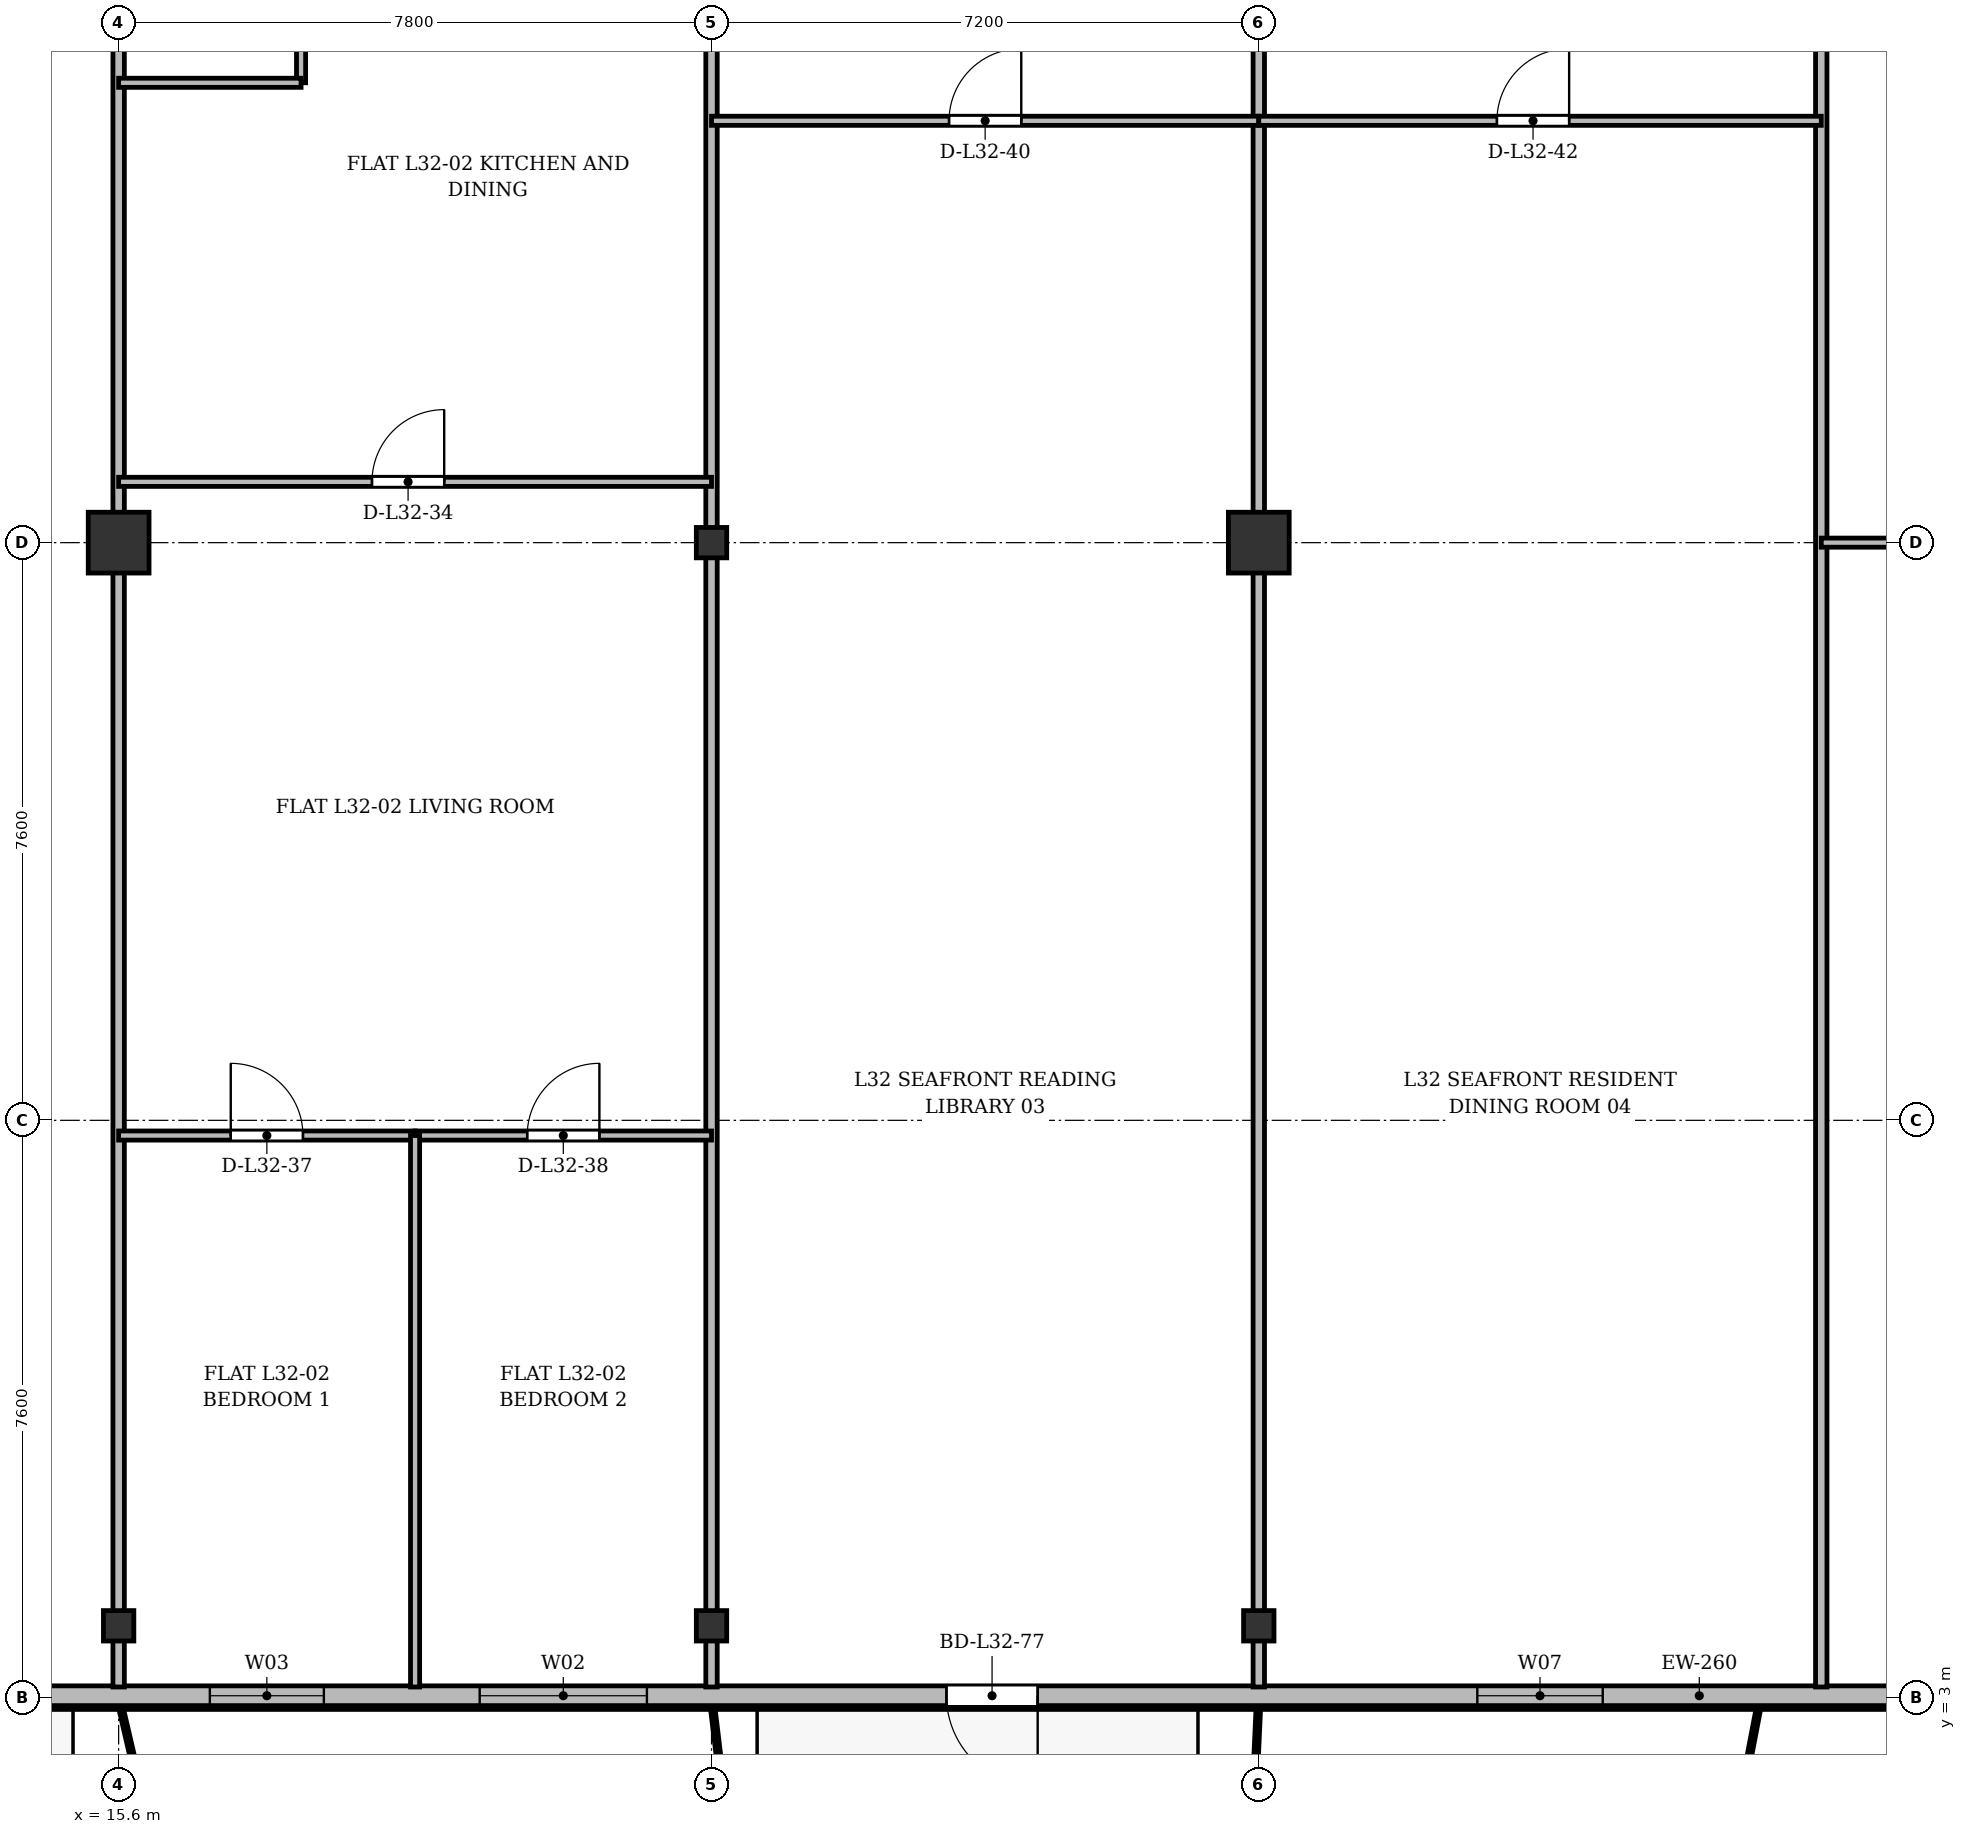
"""IFC4 building model, lengths in metres.
Left out: names, types, materials, properties, quantities, classifications, styles, units other than length and angle.
Written with IfcOpenShell. Run it as: python <this file> out.ifc"""

import sys

from ifc_helpers import new_model, si_unit, direction, frame, frame_2d, origin, origin_2d, place, context, subcontext, project, spatial, rectangle, i_section, extrude, source, transform, mapped, element, fill, save


model = new_model("IFC4")
c1 = context("Model", 3, precision=1e-05, world=origin(), true_north=direction((0.0, 1.0)))
c2 = subcontext(c1, "Body", "Model", "MODEL_VIEW")
j1 = project(units=[si_unit("LENGTHUNIT", "METRE"), si_unit("PLANEANGLEUNIT", "RADIAN")], contexts=[c1])
p1 = place(None, origin())
s1 = spatial("IfcSite", under=j1, at=p1, CompositionType="ELEMENT")
p2 = place(p1, origin())
s2 = spatial("IfcBuilding", under=s1, at=p2, CompositionType="ELEMENT")
p3 = place(p2, frame((0.0, 0.0, 124.9)))
s3 = spatial("IfcBuildingStorey", under=s2, at=p3, CompositionType="ELEMENT", Elevation=124.9)
m1 = source(origin(), c2, "Body", "SweptSolid", [
    extrude(i_section(OverallWidth=0.4, OverallDepth=0.4, WebThickness=0.022, FlangeThickness=0.035, at=origin_2d()), origin(), (0.0, 0.0, 1.0), 3.6),
])
p4 = place(p3, frame((15.6, 3.95, 0.0), z_axis=(0.0, 0.0, 1.0), x_axis=(1.0, 0.0, 0.0)))
e1 = element("IfcColumn", 1, at=p4, inside=s3, PredefinedType="COLUMN", context=c2, shape_type="MappedRepresentation", body=[
    mapped(m1, transform((0.0, 0.0, 0.0), x_axis=(1.0, 0.0, 0.0), y_axis=(0.0, 1.0, 0.0), z_axis=(0.0, 0.0, 1.0), scale=1.0)),
])
m2 = source(origin(), c2, "Body", "SweptSolid", [
    extrude(rectangle(XDim=0.8, YDim=0.8, at=origin_2d()), origin(), (0.0, 0.0, 1.0), 3.6),
])
p5 = place(p3, frame((15.6, 18.2, 0.0), z_axis=(0.0, 0.0, 1.0), x_axis=(1.0, 0.0, 0.0)))
e2 = element("IfcColumn", 2, at=p5, inside=s3, PredefinedType="COLUMN", context=c2, shape_type="MappedRepresentation", body=[
    mapped(m2, transform((0.0, 0.0, 0.0), x_axis=(1.0, 0.0, 0.0), y_axis=(0.0, 1.0, 0.0), z_axis=(0.0, 0.0, 1.0), scale=1.0)),
])
for number, where, z_axis, x_axis in (
    (3, (23.4, 3.95, 0.0), (0.0, 0.0, 1.0), (1.0, 0.0, 0.0)),
    (4, (23.4, 18.2, 0.0), (0.0, 0.0, 1.0), (1.0, 0.0, 0.0)),
    (5, (30.6, 3.95, 0.0), (0.0, 0.0, 1.0), (1.0, 0.0, 0.0)),
):
    element("IfcColumn", number, at=place(p3, frame(where, z_axis=z_axis, x_axis=x_axis)), inside=s3, PredefinedType="COLUMN", context=c2, shape_type="MappedRepresentation", body=[
        mapped(m1, transform((0.0, 0.0, 0.0), x_axis=(1.0, 0.0, 0.0), y_axis=(0.0, 1.0, 0.0), z_axis=(0.0, 0.0, 1.0), scale=1.0)),
    ])
p6 = place(p3, frame((30.6, 18.2, 0.0), z_axis=(0.0, 0.0, 1.0), x_axis=(1.0, 0.0, 0.0)))
e6 = element("IfcColumn", 6, at=p6, inside=s3, PredefinedType="COLUMN", context=c2, shape_type="MappedRepresentation", body=[
    mapped(m2, transform((0.0, 0.0, 0.0), x_axis=(1.0, 0.0, 0.0), y_axis=(0.0, 1.0, 0.0), z_axis=(0.0, 0.0, 1.0), scale=1.0)),
])
p7 = place(p3, frame((44.8, 3.03, 0.0), z_axis=(0.0, 0.0, 1.0), x_axis=(-1.0, 0.0, 0.0)))
e7 = element("IfcWall", 7, at=p7, inside=s3, PredefinedType="SOLIDWALL", context=c2, shape_type="SweptSolid", body=[
    extrude(rectangle(XDim=37.3, YDim=0.26, at=frame_2d((18.65, 0.0))), origin(), (0.0, 0.0, 1.0), 3.34),
])
p8 = place(p7, frame((2.9, 0.0, 0.9)))
e8 = element("IfcOpeningElement", 8, at=p8, cuts=e7, PredefinedType="OPENING", context=c2, shape_type="SweptSolid", body=[
    extrude(rectangle(XDim=2.0, YDim=1.95, at=frame_2d((1.0, 0.975))), frame((0.0, 0.14, 0.0), z_axis=(0.0, -1.0, 0.0), x_axis=(1.0, 0.0, 0.0)), (0.0, 0.0, 1.0), 0.28),
])
p9 = place(p7, frame((9.675, 0.0, 0.9)))
e9 = element("IfcOpeningElement", 9, at=p9, cuts=e7, PredefinedType="OPENING", context=c2, shape_type="SweptSolid", body=[
    extrude(rectangle(XDim=1.65, YDim=1.85, at=frame_2d((0.825, 0.925))), frame((0.0, 0.14, 0.0), z_axis=(0.0, -1.0, 0.0), x_axis=(1.0, 0.0, 0.0)), (0.0, 0.0, 1.0), 0.28),
])
p10 = place(p7, frame((17.109, 0.0, 0.0)))
e10 = element("IfcOpeningElement", 10, at=p10, cuts=e7, PredefinedType="OPENING", context=c2, shape_type="SweptSolid", body=[
    extrude(rectangle(XDim=1.2, YDim=2.2, at=frame_2d((0.6, 1.1))), frame((0.0, 0.14, 0.0), z_axis=(0.0, -1.0, 0.0), x_axis=(1.0, 0.0, 0.0)), (0.0, 0.0, 1.0), 0.28),
])
p11 = place(p7, frame((22.25, 0.0, 0.9)))
e11 = element("IfcOpeningElement", 11, at=p11, cuts=e7, PredefinedType="OPENING", context=c2, shape_type="SweptSolid", body=[
    extrude(rectangle(XDim=2.2, YDim=1.8, at=frame_2d((1.1, 0.9))), frame((0.0, 0.14, 0.0), z_axis=(0.0, -1.0, 0.0), x_axis=(1.0, 0.0, 0.0)), (0.0, 0.0, 1.0), 0.28),
])
p12 = place(p7, frame((26.5, 0.0, 0.9)))
e12 = element("IfcOpeningElement", 12, at=p12, cuts=e7, PredefinedType="OPENING", context=c2, shape_type="SweptSolid", body=[
    extrude(rectangle(XDim=1.5, YDim=1.75, at=frame_2d((0.75, 0.875))), frame((0.0, 0.14, 0.0), z_axis=(0.0, -1.0, 0.0), x_axis=(1.0, 0.0, 0.0)), (0.0, 0.0, 1.0), 0.28),
])
p13 = place(p7, frame((33.727, 0.0, 0.0)))
e13 = element("IfcOpeningElement", 13, at=p13, cuts=e7, PredefinedType="OPENING", context=c2, shape_type="SweptSolid", body=[
    extrude(rectangle(XDim=1.2, YDim=2.2, at=frame_2d((0.6, 1.1))), frame((0.0, 0.14, 0.0), z_axis=(0.0, -1.0, 0.0), x_axis=(1.0, 0.0, 0.0)), (0.0, 0.0, 1.0), 0.28),
])
for number, where, z_axis, x_axis in (
    (14, (15.6, 3.145, 0.0), (0.0, 0.0, 1.0), (0.0, 1.0, 0.0)),
    (15, (23.4, 3.145, 0.0), (0.0, 0.0, 1.0), (0.0, 1.0, 0.0)),
    (16, (30.6, 3.145, 0.0), (0.0, 0.0, 1.0), (0.0, 1.0, 0.0)),
):
    element("IfcWall", number, at=place(p3, frame(where, z_axis=z_axis, x_axis=x_axis)), inside=s3, PredefinedType="PARTITIONING", context=c2, shape_type="SweptSolid", body=[
        extrude(rectangle(XDim=24.455, YDim=0.15, at=frame_2d((12.228, 0.0))), origin(), (0.0, 0.0, 1.0), 2.84),
    ])
p14 = place(p3, frame((38.0, 3.145, 0.0), z_axis=(0.0, 0.0, 1.0), x_axis=(0.0, 1.0, 0.0)))
e17 = element("IfcWall", 17, at=p14, inside=s3, PredefinedType="PARTITIONING", context=c2, shape_type="SweptSolid", body=[
    extrude(rectangle(XDim=24.455, YDim=0.15, at=frame_2d((12.228, 0.0))), origin(), (0.0, 0.0, 1.0), 2.752),
])
p15 = place(p3, frame((15.6, 19.0, 0.0), z_axis=(0.0, 0.0, 1.0), x_axis=(1.0, 0.0, 0.0)))
e18 = element("IfcWall", 18, at=p15, inside=s3, PredefinedType="PARTITIONING", context=c2, shape_type="SweptSolid", body=[
    extrude(rectangle(XDim=7.8, YDim=0.12, at=frame_2d((3.9, 0.0))), origin(), (0.0, 0.0, 1.0), 2.84),
])
p16 = place(p15, frame((3.333, 0.0, 0.0)))
e19 = element("IfcOpeningElement", 19, at=p16, cuts=e18, PredefinedType="OPENING", context=c2, shape_type="SweptSolid", body=[
    extrude(rectangle(XDim=0.95, YDim=2.15, at=frame_2d((0.475, 1.075))), frame((0.0, 0.07, 0.0), z_axis=(0.0, -1.0, 0.0), x_axis=(1.0, 0.0, 0.0)), (0.0, 0.0, 1.0), 0.14),
])
p17 = place(p3, frame((18.0, 24.25, 0.0), z_axis=(0.0, 0.0, 1.0), x_axis=(0.0, 1.0, 0.0)))
e20 = element("IfcWall", 20, at=p17, inside=s3, PredefinedType="PARTITIONING", context=c2, shape_type="SweptSolid", body=[
    extrude(rectangle(XDim=3.35, YDim=0.12, at=frame_2d((1.675, 0.0))), origin(), (0.0, 0.0, 1.0), 2.99),
])
p18 = place(p17, frame((0.8, 0.0, 0.0)))
e21 = element("IfcOpeningElement", 21, at=p18, cuts=e20, PredefinedType="OPENING", context=c2, shape_type="SweptSolid", body=[
    extrude(rectangle(XDim=0.85, YDim=2.1, at=frame_2d((0.425, 1.05))), frame((0.0, 0.07, 0.0), z_axis=(0.0, -1.0, 0.0), x_axis=(1.0, 0.0, 0.0)), (0.0, 0.0, 1.0), 0.14),
])
p19 = place(p3, frame((15.6, 24.25, 0.0), z_axis=(0.0, 0.0, 1.0), x_axis=(1.0, 0.0, 0.0)))
e22 = element("IfcWall", 22, at=p19, inside=s3, PredefinedType="PARTITIONING", context=c2, shape_type="SweptSolid", body=[
    extrude(rectangle(XDim=2.4, YDim=0.12, at=frame_2d((1.2, 0.0))), origin(), (0.0, 0.0, 1.0), 2.84),
])
p20 = place(p3, frame((15.6, 10.4, 0.0), z_axis=(0.0, 0.0, 1.0), x_axis=(1.0, 0.0, 0.0)))
e23 = element("IfcWall", 23, at=p20, inside=s3, PredefinedType="PARTITIONING", context=c2, shape_type="SweptSolid", body=[
    extrude(rectangle(XDim=3.9, YDim=0.12, at=frame_2d((1.95, 0.0))), origin(), (0.0, 0.0, 1.0), 2.84),
])
p21 = place(p20, frame((1.475, 0.0, 0.0)))
e24 = element("IfcOpeningElement", 24, at=p21, cuts=e23, PredefinedType="OPENING", context=c2, shape_type="SweptSolid", body=[
    extrude(rectangle(XDim=0.95, YDim=2.15, at=frame_2d((0.475, 1.075))), frame((0.0, 0.07, 0.0), z_axis=(0.0, -1.0, 0.0), x_axis=(1.0, 0.0, 0.0)), (0.0, 0.0, 1.0), 0.14),
])
p22 = place(p3, frame((19.5, 10.4, 0.0), z_axis=(0.0, 0.0, 1.0), x_axis=(1.0, 0.0, 0.0)))
e25 = element("IfcWall", 25, at=p22, inside=s3, PredefinedType="PARTITIONING", context=c2, shape_type="SweptSolid", body=[
    extrude(rectangle(XDim=3.9, YDim=0.12, at=frame_2d((1.95, 0.0))), origin(), (0.0, 0.0, 1.0), 2.84),
])
p23 = place(p22, frame((1.475, 0.0, 0.0)))
e26 = element("IfcOpeningElement", 26, at=p23, cuts=e25, PredefinedType="OPENING", context=c2, shape_type="SweptSolid", body=[
    extrude(rectangle(XDim=0.95, YDim=2.15, at=frame_2d((0.475, 1.075))), frame((0.0, 0.07, 0.0), z_axis=(0.0, -1.0, 0.0), x_axis=(1.0, 0.0, 0.0)), (0.0, 0.0, 1.0), 0.14),
])
p24 = place(p3, frame((19.5, 3.145, 0.0), z_axis=(0.0, 0.0, 1.0), x_axis=(0.0, 1.0, 0.0)))
e27 = element("IfcWall", 27, at=p24, inside=s3, PredefinedType="PARTITIONING", context=c2, shape_type="SweptSolid", body=[
    extrude(rectangle(XDim=7.255, YDim=0.12, at=frame_2d((3.627, 0.0))), origin(), (0.0, 0.0, 1.0), 2.752),
])
p25 = place(p3, frame((23.4, 23.75, 0.0), z_axis=(0.0, 0.0, 1.0), x_axis=(1.0, 0.0, 0.0)))
e28 = element("IfcWall", 28, at=p25, inside=s3, PredefinedType="PARTITIONING", context=c2, shape_type="SweptSolid", body=[
    extrude(rectangle(XDim=7.2, YDim=0.12, at=frame_2d((3.6, 0.0))), origin(), (0.0, 0.0, 1.0), 2.84),
])
p26 = place(p25, frame((3.125, 0.0, 0.0)))
e29 = element("IfcOpeningElement", 29, at=p26, cuts=e28, PredefinedType="OPENING", context=c2, shape_type="SweptSolid", body=[
    extrude(rectangle(XDim=0.95, YDim=2.15, at=frame_2d((0.475, 1.075))), frame((0.0, 0.07, 0.0), z_axis=(0.0, -1.0, 0.0), x_axis=(1.0, 0.0, 0.0)), (0.0, 0.0, 1.0), 0.14),
])
p27 = place(p3, frame((30.6, 23.75, 0.0), z_axis=(0.0, 0.0, 1.0), x_axis=(1.0, 0.0, 0.0)))
e30 = element("IfcWall", 30, at=p27, inside=s3, PredefinedType="PARTITIONING", context=c2, shape_type="SweptSolid", body=[
    extrude(rectangle(XDim=7.4, YDim=0.12, at=frame_2d((3.7, 0.0))), origin(), (0.0, 0.0, 1.0), 2.84),
])
p28 = place(p27, frame((3.133, 0.0, 0.0)))
e31 = element("IfcOpeningElement", 31, at=p28, cuts=e30, PredefinedType="OPENING", context=c2, shape_type="SweptSolid", body=[
    extrude(rectangle(XDim=0.95, YDim=2.15, at=frame_2d((0.475, 1.075))), frame((0.0, 0.07, 0.0), z_axis=(0.0, -1.0, 0.0), x_axis=(1.0, 0.0, 0.0)), (0.0, 0.0, 1.0), 0.14),
])
p29 = place(p3, frame((38.0, 18.2, 0.0), z_axis=(0.0, 0.0, 1.0), x_axis=(1.0, 0.0, 0.0)))
e32 = element("IfcWall", 32, at=p29, inside=s3, PredefinedType="PARTITIONING", context=c2, shape_type="SweptSolid", body=[
    extrude(rectangle(XDim=5.8, YDim=0.12, at=frame_2d((2.9, 0.0))), origin(), (0.0, 0.0, 1.0), 2.752),
])
p30 = place(p29, frame((2.425, 0.0, 0.0)))
e33 = element("IfcOpeningElement", 33, at=p30, cuts=e32, PredefinedType="OPENING", context=c2, shape_type="SweptSolid", body=[
    extrude(rectangle(XDim=0.95, YDim=2.15, at=frame_2d((0.475, 1.075))), frame((0.0, 0.07, 0.0), z_axis=(0.0, -1.0, 0.0), x_axis=(1.0, 0.0, 0.0)), (0.0, 0.0, 1.0), 0.14),
])
m3 = source(origin(), c2, "Body", "SweptSolid", [
    extrude(rectangle(XDim=1.65, YDim=1.85, at=frame_2d((0.825, 0.925))), frame((0.0, 0.03, 0.0), z_axis=(0.0, -1.0, 0.0), x_axis=(1.0, 0.0, 0.0)), (0.0, 0.0, 1.0), 0.06),
])
p31 = place(p9, origin())
e34 = element("IfcWindow", 34, at=p31, inside=s3, PartitioningType="SINGLE_PANEL", PredefinedType="WINDOW", context=c2, shape_type="MappedRepresentation", body=[
    mapped(m3, transform((0.0, 0.0, 0.0), x_axis=(1.0, 0.0, 0.0), y_axis=(0.0, 1.0, 0.0), z_axis=(0.0, 0.0, 1.0), scale=1.0)),
])
fill(e9, e34)
m4 = source(origin(), c2, "Body", "SweptSolid", [
    extrude(rectangle(XDim=1.2, YDim=2.2, at=frame_2d((0.6, 1.1))), frame((0.0, 0.025, 0.0), z_axis=(0.0, -1.0, 0.0), x_axis=(1.0, 0.0, 0.0)), (0.0, 0.0, 1.0), 0.05),
])
p32 = place(p10, origin())
e35 = element("IfcDoor", 35, at=p32, inside=s3, OperationType="SINGLE_SWING_LEFT", PredefinedType="DOOR", context=c2, shape_type="MappedRepresentation", body=[
    mapped(m4, transform((0.0, 0.0, 0.0), x_axis=(1.0, 0.0, 0.0), y_axis=(0.0, 1.0, 0.0), z_axis=(0.0, 0.0, 1.0), scale=1.0)),
])
fill(e10, e35)
m5 = source(origin(), c2, "Body", "SweptSolid", [
    extrude(rectangle(XDim=2.2, YDim=1.8, at=frame_2d((1.1, 0.9))), frame((0.0, 0.03, 0.0), z_axis=(0.0, -1.0, 0.0), x_axis=(1.0, 0.0, 0.0)), (0.0, 0.0, 1.0), 0.06),
])
p33 = place(p11, origin())
e36 = element("IfcWindow", 36, at=p33, inside=s3, PartitioningType="SINGLE_PANEL", PredefinedType="WINDOW", context=c2, shape_type="MappedRepresentation", body=[
    mapped(m5, transform((0.0, 0.0, 0.0), x_axis=(1.0, 0.0, 0.0), y_axis=(0.0, 1.0, 0.0), z_axis=(0.0, 0.0, 1.0), scale=1.0)),
])
fill(e11, e36)
m6 = source(origin(), c2, "Body", "SweptSolid", [
    extrude(rectangle(XDim=1.5, YDim=1.75, at=frame_2d((0.75, 0.875))), frame((0.0, 0.03, 0.0), z_axis=(0.0, -1.0, 0.0), x_axis=(1.0, 0.0, 0.0)), (0.0, 0.0, 1.0), 0.06),
])
p34 = place(p12, origin())
e37 = element("IfcWindow", 37, at=p34, inside=s3, PartitioningType="SINGLE_PANEL", PredefinedType="WINDOW", context=c2, shape_type="MappedRepresentation", body=[
    mapped(m6, transform((0.0, 0.0, 0.0), x_axis=(1.0, 0.0, 0.0), y_axis=(0.0, 1.0, 0.0), z_axis=(0.0, 0.0, 1.0), scale=1.0)),
])
fill(e12, e37)
m7 = source(origin(), c2, "Body", "SweptSolid", [
    extrude(rectangle(XDim=0.95, YDim=2.15, at=frame_2d((0.475, 1.075))), frame((0.0, 0.025, 0.0), z_axis=(0.0, -1.0, 0.0), x_axis=(1.0, 0.0, 0.0)), (0.0, 0.0, 1.0), 0.05),
])
p35 = place(p16, origin())
e38 = element("IfcDoor", 38, at=p35, inside=s3, OperationType="SINGLE_SWING_RIGHT", PredefinedType="DOOR", context=c2, shape_type="MappedRepresentation", body=[
    mapped(m7, transform((0.0, 0.0, 0.0), x_axis=(1.0, 0.0, 0.0), y_axis=(0.0, 1.0, 0.0), z_axis=(0.0, 0.0, 1.0), scale=1.0)),
])
fill(e19, e38)
p36 = place(p21, origin())
e39 = element("IfcDoor", 39, at=p36, inside=s3, OperationType="SINGLE_SWING_LEFT", PredefinedType="DOOR", context=c2, shape_type="MappedRepresentation", body=[
    mapped(m7, transform((0.0, 0.0, 0.0), x_axis=(1.0, 0.0, 0.0), y_axis=(0.0, 1.0, 0.0), z_axis=(0.0, 0.0, 1.0), scale=1.0)),
])
fill(e24, e39)
p37 = place(p23, origin())
e40 = element("IfcDoor", 40, at=p37, inside=s3, OperationType="SINGLE_SWING_RIGHT", PredefinedType="DOOR", context=c2, shape_type="MappedRepresentation", body=[
    mapped(m7, transform((0.0, 0.0, 0.0), x_axis=(1.0, 0.0, 0.0), y_axis=(0.0, 1.0, 0.0), z_axis=(0.0, 0.0, 1.0), scale=1.0)),
])
fill(e26, e40)
p38 = place(p26, origin())
e41 = element("IfcDoor", 41, at=p38, inside=s3, OperationType="SINGLE_SWING_RIGHT", PredefinedType="DOOR", context=c2, shape_type="MappedRepresentation", body=[
    mapped(m7, transform((0.0, 0.0, 0.0), x_axis=(1.0, 0.0, 0.0), y_axis=(0.0, 1.0, 0.0), z_axis=(0.0, 0.0, 1.0), scale=1.0)),
])
fill(e29, e41)
p39 = place(p28, origin())
e42 = element("IfcDoor", 42, at=p39, inside=s3, OperationType="SINGLE_SWING_RIGHT", PredefinedType="DOOR", context=c2, shape_type="MappedRepresentation", body=[
    mapped(m7, transform((0.0, 0.0, 0.0), x_axis=(1.0, 0.0, 0.0), y_axis=(0.0, 1.0, 0.0), z_axis=(0.0, 0.0, 1.0), scale=1.0)),
])
fill(e31, e42)
save(model, sys.argv[1])
